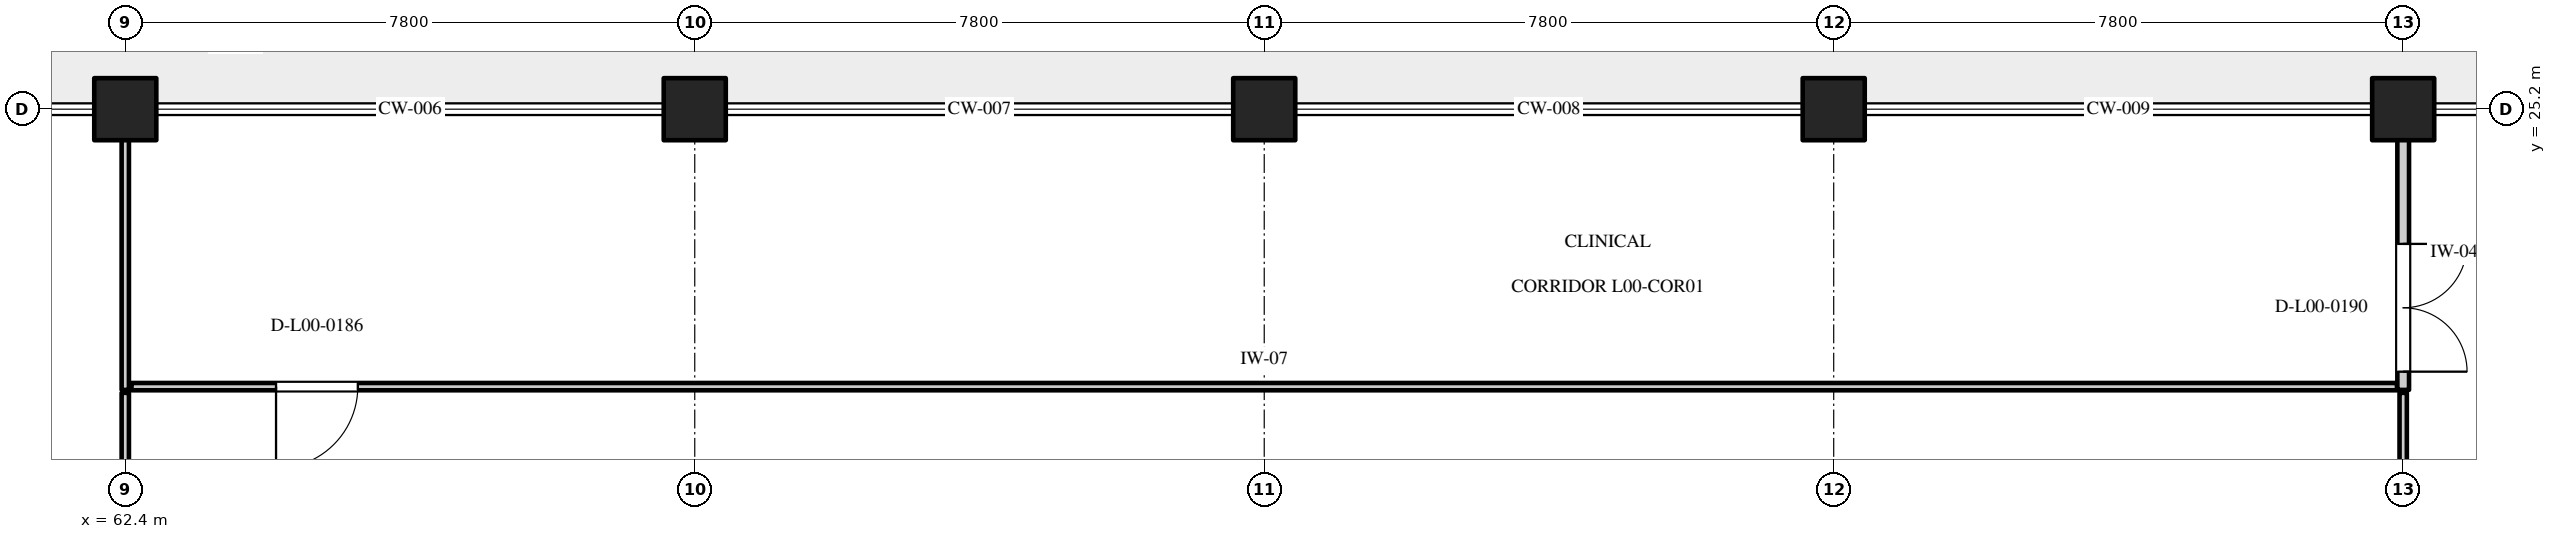
"""IFC4 building model, lengths in metres.
Left out: names, types, materials, properties, quantities, classifications, styles, units other than length and angle.
Written with IfcOpenShell. Run it as: python <this file> out.ifc"""

import sys

from ifc_helpers import new_model, si_unit, direction, frame, frame_2d, origin, origin_2d, place, context, subcontext, project, spatial, rectangle, extrude, element, fill, save


model = new_model("IFC4")
c1 = context("Model", 3, precision=1e-05, world=origin(), true_north=direction((0.0, 1.0)))
c2 = subcontext(c1, "Body", "Model", "MODEL_VIEW")
j1 = project(units=[si_unit("LENGTHUNIT", "METRE"), si_unit("PLANEANGLEUNIT", "RADIAN")], contexts=[c1])
p1 = place(None, origin())
s1 = spatial("IfcSite", under=j1, at=p1, CompositionType="ELEMENT")
p2 = place(p1, origin())
s2 = spatial("IfcBuilding", under=s1, at=p2, CompositionType="ELEMENT")
p3 = place(p2, origin())
s3 = spatial("IfcBuildingStorey", under=s2, at=p3, CompositionType="ELEMENT", Elevation=0.0)
for number, where, z_axis, x_axis in (
    (1, (62.4, 25.2, 0.0), (0.0, 0.0, 1.0), (1.0, 0.0, 0.0)),
    (2, (70.2, 25.2, 0.0), (0.0, 0.0, 1.0), (1.0, 0.0, 0.0)),
    (3, (78.0, 25.2, 0.0), (0.0, 0.0, 1.0), (1.0, 0.0, 0.0)),
    (4, (85.8, 25.2, 0.0), (0.0, 0.0, 1.0), (1.0, 0.0, 0.0)),
    (5, (93.6, 25.2, 0.0), (0.0, 0.0, 1.0), (1.0, 0.0, 0.0)),
):
    element("IfcColumn", number, at=place(p3, frame(where, z_axis=z_axis, x_axis=x_axis)), inside=s3, PredefinedType="COLUMN", context=c2, shape_type="SweptSolid", body=[
        extrude(rectangle(XDim=0.85, YDim=0.85, at=origin_2d()), origin(), (0.0, 0.0, 1.0), 4.8),
    ])
p4 = place(p3, frame((62.485, 21.4, 0.0), z_axis=(0.0, 0.0, 1.0), x_axis=(1.0, 0.0, 0.0)))
e6 = element("IfcWall", 6, at=p4, inside=s3, PredefinedType="PARTITIONING", context=c2, shape_type="SweptSolid", body=[
    extrude(rectangle(XDim=31.03, YDim=0.1, at=frame_2d((15.515, 0.0))), origin(), (0.0, 0.0, 1.0), 4.43),
])
p5 = place(p4, frame((1.98, 0.0, 0.0)))
e7 = element("IfcOpeningElement", 7, at=p5, cuts=e6, PredefinedType="OPENING", context=c2, shape_type="SweptSolid", body=[
    extrude(rectangle(XDim=1.12, YDim=2.2, at=frame_2d((0.56, 1.1))), frame((0.0, 0.062, 0.0), z_axis=(0.0, -1.0, 0.0), x_axis=(1.0, 0.0, 0.0)), (0.0, 0.0, 1.0), 0.124),
])
for number, where, z_axis, x_axis in (
    (8, (62.4, 0.085, 0.0), (0.0, 0.0, 1.0), (0.0, 1.0, 0.0)),
    (9, (93.6, 0.085, 0.0), (0.0, 0.0, 1.0), (0.0, 1.0, 0.0)),
):
    element("IfcWall", number, at=place(p3, frame(where, z_axis=z_axis, x_axis=x_axis)), inside=s3, PredefinedType="PARTITIONING", context=c2, shape_type="SweptSolid", body=[
        extrude(rectangle(XDim=21.23, YDim=0.1, at=frame_2d((10.615, 0.0))), origin(), (0.0, 0.0, 1.0), 4.43),
    ])
p6 = place(p3, frame((62.4, 21.355, 0.0), z_axis=(0.0, 0.0, 1.0), x_axis=(0.0, 1.0, 0.0)))
e10 = element("IfcWall", 10, at=p6, inside=s3, PredefinedType="PARTITIONING", context=c2, shape_type="SweptSolid", body=[
    extrude(rectangle(XDim=3.76, YDim=0.1, at=frame_2d((1.88, 0.0))), origin(), (0.0, 0.0, 1.0), 4.43),
])
p7 = place(p3, frame((93.6, 21.355, 0.0), z_axis=(0.0, 0.0, 1.0), x_axis=(0.0, 1.0, 0.0)))
e11 = element("IfcWall", 11, at=p7, inside=s3, PredefinedType="PARTITIONING", context=c2, shape_type="SweptSolid", body=[
    extrude(rectangle(XDim=3.76, YDim=0.16, at=frame_2d((1.88, 0.0))), origin(), (0.0, 0.0, 1.0), 4.43),
])
p8 = place(p7, frame((0.25, 0.0, 0.0)))
e12 = element("IfcOpeningElement", 12, at=p8, cuts=e11, PredefinedType="OPENING", context=c2, shape_type="SweptSolid", body=[
    extrude(rectangle(XDim=1.75, YDim=2.3, at=frame_2d((0.875, 1.15))), frame((0.0, 0.092, 0.0), z_axis=(0.0, -1.0, 0.0), x_axis=(1.0, 0.0, 0.0)), (0.0, 0.0, 1.0), 0.184),
])
p9 = place(p5, frame((1.12, 0.0, 0.0), z_axis=(0.0, 0.0, 1.0), x_axis=(-1.0, 0.0, 0.0)))
e13 = element("IfcDoor", 13, at=p9, inside=s3, OperationType="SINGLE_SWING_RIGHT", PredefinedType="DOOR", context=c2, shape_type="SweptSolid", body=[
    extrude(rectangle(XDim=1.12, YDim=2.2, at=frame_2d((0.56, 1.1))), frame((0.0, 0.025, 0.0), z_axis=(0.0, -1.0, 0.0), x_axis=(1.0, 0.0, 0.0)), (0.0, 0.0, 1.0), 0.05),
])
fill(e7, e13)
p10 = place(p8, frame((1.75, 0.0, 0.0), z_axis=(0.0, 0.0, 1.0), x_axis=(-1.0, 0.0, 0.0)))
e14 = element("IfcDoor", 14, at=p10, inside=s3, OperationType="DOUBLE_DOOR_SINGLE_SWING", PredefinedType="DOOR", context=c2, shape_type="SweptSolid", body=[
    extrude(rectangle(XDim=1.75, YDim=2.3, at=frame_2d((0.875, 1.15))), frame((0.0, 0.025, 0.0), z_axis=(0.0, -1.0, 0.0), x_axis=(1.0, 0.0, 0.0)), (0.0, 0.0, 1.0), 0.05),
])
fill(e12, e14)
save(model, sys.argv[1])
